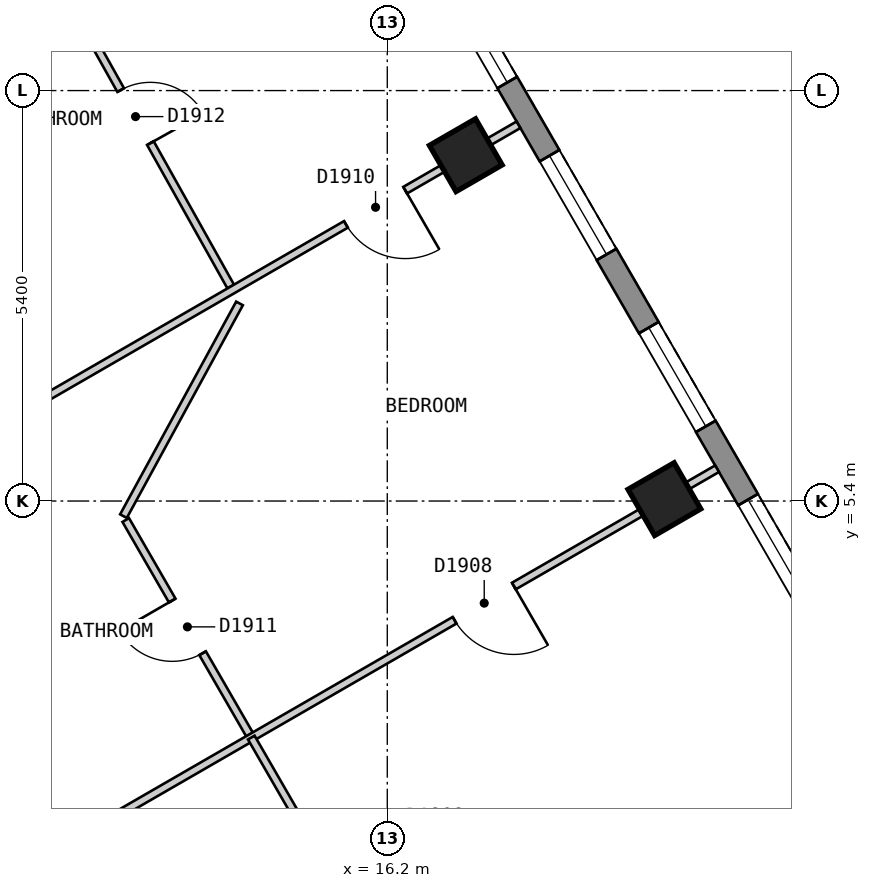
"""IFC4 building model, lengths in metres.
Left out: names, types, materials, properties, quantities, classifications, styles, units other than length and angle.
Written with IfcOpenShell. Run it as: python <this file> out.ifc"""

import sys

from ifc_helpers import new_model, si_unit, direction, frame, frame_2d, origin, origin_2d, place, context, subcontext, project, spatial, polyline, rectangle, outline, extrude, element, fill, save


model = new_model("IFC4")
c1 = context("Model", 3, precision=1e-05, world=origin(), true_north=direction((0.0, 1.0)))
c2 = subcontext(c1, "Body", "Model", "MODEL_VIEW")
j1 = project(units=[si_unit("LENGTHUNIT", "METRE"), si_unit("PLANEANGLEUNIT", "RADIAN")], contexts=[c1])
p1 = place(None, origin())
s1 = spatial("IfcSite", under=j1, at=p1, CompositionType="ELEMENT")
p2 = place(p1, origin())
s2 = spatial("IfcBuilding", under=s1, at=p2, CompositionType="ELEMENT")
p3 = place(p2, frame((0.0, 0.0, 220.8)))
s3 = spatial("IfcBuildingStorey", under=s2, at=p3, CompositionType="ELEMENT", Elevation=220.8)
for number, where, z_axis, x_axis in (
    (1, (19.846, 5.425, 0.0), (0.0, 0.0, 1.0), (-0.5, 0.866, 0.0)),
    (2, (17.233, 9.95, 0.0), (0.0, 0.0, 1.0), (-0.5, 0.866, 0.0)),
):
    element("IfcColumn", number, at=place(p3, frame(where, z_axis=z_axis, x_axis=x_axis)), inside=s3, PredefinedType="COLUMN", context=c2, shape_type="SweptSolid", body=[
        extrude(rectangle(XDim=0.7, YDim=0.7, at=origin_2d()), origin(), (0.0, 0.0, 1.0), 3.0),
    ])
p4 = place(p3, frame((23.599, 0.825, 0.0), z_axis=(0.0, 0.0, 1.0), x_axis=(-0.500003656944, 0.866023292436, 0.0)))
e3 = element("IfcWall", 3, at=p4, inside=s3, PredefinedType="SOLIDWALL", context=c2, shape_type="SweptSolid", body=[
    extrude(outline(polyline([(0.0, -0.15), (22.17, -0.15), (22.09, 0.15), (0.08, 0.15), (0.0, -0.15)])), origin(), (0.0, 0.0, 1.0), 2.7),
])
p5 = place(p4, frame((1.191, 0.0, 0.15)))
e4 = element("IfcOpeningElement", 4, at=p5, cuts=e3, PredefinedType="OPENING", context=c2, shape_type="SweptSolid", body=[
    extrude(rectangle(XDim=1.5, YDim=2.1, at=frame_2d((0.75, 1.05))), frame((0.0, 0.16, 0.0), z_axis=(0.0, -1.0, 0.0), x_axis=(1.0, 0.0, 0.0)), (0.0, 0.0, 1.0), 0.32),
])
p6 = place(p4, frame((3.804, 0.0, 0.15)))
e5 = element("IfcOpeningElement", 5, at=p6, cuts=e3, PredefinedType="OPENING", context=c2, shape_type="SweptSolid", body=[
    extrude(rectangle(XDim=1.5, YDim=2.1, at=frame_2d((0.75, 1.05))), frame((0.0, 0.16, 0.0), z_axis=(0.0, -1.0, 0.0), x_axis=(1.0, 0.0, 0.0)), (0.0, 0.0, 1.0), 0.32),
])
p7 = place(p4, frame((6.417, 0.0, 0.15)))
e6 = element("IfcOpeningElement", 6, at=p7, cuts=e3, PredefinedType="OPENING", context=c2, shape_type="SweptSolid", body=[
    extrude(rectangle(XDim=1.5, YDim=2.1, at=frame_2d((0.75, 1.05))), frame((0.0, 0.16, 0.0), z_axis=(0.0, -1.0, 0.0), x_axis=(1.0, 0.0, 0.0)), (0.0, 0.0, 1.0), 0.32),
])
p8 = place(p4, frame((9.029, 0.0, 0.15)))
e7 = element("IfcOpeningElement", 7, at=p8, cuts=e3, PredefinedType="OPENING", context=c2, shape_type="SweptSolid", body=[
    extrude(rectangle(XDim=1.5, YDim=2.1, at=frame_2d((0.75, 1.05))), frame((0.0, 0.16, 0.0), z_axis=(0.0, -1.0, 0.0), x_axis=(1.0, 0.0, 0.0)), (0.0, 0.0, 1.0), 0.32),
])
p9 = place(p4, frame((11.641, 0.0, 0.15)))
e8 = element("IfcOpeningElement", 8, at=p9, cuts=e3, PredefinedType="OPENING", context=c2, shape_type="SweptSolid", body=[
    extrude(rectangle(XDim=1.5, YDim=2.1, at=frame_2d((0.75, 1.05))), frame((0.0, 0.16, 0.0), z_axis=(0.0, -1.0, 0.0), x_axis=(1.0, 0.0, 0.0)), (0.0, 0.0, 1.0), 0.32),
])
p10 = place(p4, frame((14.254, 0.0, 0.15)))
e9 = element("IfcOpeningElement", 9, at=p10, cuts=e3, PredefinedType="OPENING", context=c2, shape_type="SweptSolid", body=[
    extrude(rectangle(XDim=1.5, YDim=2.1, at=frame_2d((0.75, 1.05))), frame((0.0, 0.16, 0.0), z_axis=(0.0, -1.0, 0.0), x_axis=(1.0, 0.0, 0.0)), (0.0, 0.0, 1.0), 0.32),
])
p11 = place(p4, frame((16.866, 0.0, 0.15)))
e10 = element("IfcOpeningElement", 10, at=p11, cuts=e3, PredefinedType="OPENING", context=c2, shape_type="SweptSolid", body=[
    extrude(rectangle(XDim=1.5, YDim=2.1, at=frame_2d((0.75, 1.05))), frame((0.0, 0.16, 0.0), z_axis=(0.0, -1.0, 0.0), x_axis=(1.0, 0.0, 0.0)), (0.0, 0.0, 1.0), 0.32),
])
p12 = place(p4, frame((19.479, 0.0, 0.15)))
e11 = element("IfcOpeningElement", 11, at=p12, cuts=e3, PredefinedType="OPENING", context=c2, shape_type="SweptSolid", body=[
    extrude(rectangle(XDim=1.5, YDim=2.1, at=frame_2d((0.75, 1.05))), frame((0.0, 0.16, 0.0), z_axis=(0.0, -1.0, 0.0), x_axis=(1.0, 0.0, 0.0)), (0.0, 0.0, 1.0), 0.32),
])
p13 = place(p3, frame((9.238, 5.2, 0.0), z_axis=(0.0, 0.0, 1.0), x_axis=(0.500025705601, -0.86601056214, 0.0)))
e12 = element("IfcWall", 12, at=p13, inside=s3, PredefinedType="PARTITIONING", context=c2, shape_type="SweptSolid", body=[
    extrude(rectangle(XDim=7.735, YDim=0.2, at=frame_2d((3.868, 0.0))), origin(), (0.0, 0.0, 1.0), 2.7),
])
p14 = place(p3, frame((12.759, 5.15, 0.0), z_axis=(0.0, 0.0, 1.0), x_axis=(0.499905801698, -0.866079782369, 0.0)))
e13 = element("IfcWall", 13, at=p14, inside=s3, PredefinedType="PARTITIONING", context=c2, shape_type="SweptSolid", body=[
    extrude(rectangle(XDim=3.304, YDim=0.1, at=frame_2d((1.652, 0.0))), origin(), (0.0, 0.0, 1.0), 2.7),
])
p15 = place(p14, frame((1.223, 0.0, 0.0)))
e14 = element("IfcOpeningElement", 14, at=p15, cuts=e13, PredefinedType="OPENING", context=c2, shape_type="SweptSolid", body=[
    extrude(rectangle(XDim=0.8, YDim=2.1, at=frame_2d((0.4, 1.05))), frame((0.0, 0.06, 0.0), z_axis=(0.0, -1.0, 0.0), x_axis=(1.0, 0.0, 0.0)), (0.0, 0.0, 1.0), 0.12),
])
p16 = place(p3, frame((11.66, 12.65, 0.0), z_axis=(0.0, 0.0, 1.0), x_axis=(0.488650242737, -0.872479764965, 0.0)))
e15 = element("IfcWall", 15, at=p16, inside=s3, PredefinedType="PARTITIONING", context=c2, shape_type="SweptSolid", body=[
    extrude(rectangle(XDim=5.075, YDim=0.1, at=frame_2d((2.538, 0.0))), origin(), (0.0, 0.0, 1.0), 2.7),
])
p17 = place(p16, frame((2.113, 0.0, 0.0)))
e16 = element("IfcOpeningElement", 16, at=p17, cuts=e15, PredefinedType="OPENING", context=c2, shape_type="SweptSolid", body=[
    extrude(rectangle(XDim=0.8, YDim=2.1, at=frame_2d((0.4, 1.05))), frame((0.0, 0.06, 0.0), z_axis=(0.0, -1.0, 0.0), x_axis=(1.0, 0.0, 0.0)), (0.0, 0.0, 1.0), 0.12),
])
p18 = place(p3, frame((12.729, 5.201, 0.0), z_axis=(0.0, 0.0, 1.0), x_axis=(0.478932598182, 0.877851676764, 0.0)))
e17 = element("IfcWall", 17, at=p18, inside=s3, PredefinedType="PARTITIONING", context=c2, shape_type="SweptSolid", body=[
    extrude(rectangle(XDim=3.188, YDim=0.1, at=frame_2d((1.594, 0.0))), origin(), (0.0, 0.0, 1.0), 2.7),
])
p19 = place(p3, frame((11.879, 0.826, 0.0), z_axis=(0.0, 0.0, 1.0), x_axis=(0.866065245018, 0.499930986609, 0.0)))
e18 = element("IfcWall", 18, at=p19, inside=s3, PredefinedType="PARTITIONING", context=c2, shape_type="SweptSolid", body=[
    extrude(rectangle(XDim=10.0, YDim=0.1, at=frame_2d((5.0, 0.0))), origin(), (0.0, 0.0, 1.0), 2.7),
])
p20 = place(p19, frame((6.012, 0.0, 0.0)))
e19 = element("IfcOpeningElement", 19, at=p20, cuts=e18, PredefinedType="OPENING", context=c2, shape_type="SweptSolid", body=[
    extrude(rectangle(XDim=0.9, YDim=2.1, at=frame_2d((0.45, 1.05))), frame((0.0, 0.06, 0.0), z_axis=(0.0, -1.0, 0.0), x_axis=(1.0, 0.0, 0.0)), (0.0, 0.0, 1.0), 0.12),
])
p21 = place(p3, frame((9.354, 5.401, 0.0), z_axis=(0.0, 0.0, 1.0), x_axis=(0.866018411306, 0.500012111133, 0.0)))
e20 = element("IfcWall", 20, at=p21, inside=s3, PredefinedType="PARTITIONING", context=c2, shape_type="SweptSolid", body=[
    extrude(rectangle(XDim=9.898, YDim=0.1, at=frame_2d((4.949, 0.0))), origin(), (0.0, 0.0, 1.0), 2.7),
])
p22 = place(p21, frame((7.277, 0.0, 0.0)))
e21 = element("IfcOpeningElement", 21, at=p22, cuts=e20, PredefinedType="OPENING", context=c2, shape_type="SweptSolid", body=[
    extrude(rectangle(XDim=0.9, YDim=2.1, at=frame_2d((0.45, 1.05))), frame((0.0, 0.06, 0.0), z_axis=(0.0, -1.0, 0.0), x_axis=(1.0, 0.0, 0.0)), (0.0, 0.0, 1.0), 0.12),
])
p23 = place(p3, frame((14.411, 2.288, 0.0), z_axis=(0.0, 0.0, 1.0), x_axis=(0.500009005995, -0.866020204108, 0.0)))
e22 = element("IfcWall", 22, at=p23, inside=s3, PredefinedType="PARTITIONING", context=c2, shape_type="SweptSolid", body=[
    extrude(rectangle(XDim=1.696, YDim=0.1, at=frame_2d((0.848, 0.0))), origin(), (0.0, 0.0, 1.0), 2.7),
])
p24 = place(p6, origin())
e23 = element("IfcWindow", 23, at=p24, inside=s3, PartitioningType="SINGLE_PANEL", PredefinedType="WINDOW", context=c2, shape_type="SweptSolid", body=[
    extrude(rectangle(XDim=1.5, YDim=2.1, at=frame_2d((0.75, 1.05))), frame((0.0, 0.03, 0.0), z_axis=(0.0, -1.0, 0.0), x_axis=(1.0, 0.0, 0.0)), (0.0, 0.0, 1.0), 0.06),
])
fill(e5, e23)
p25 = place(p7, origin())
e24 = element("IfcWindow", 24, at=p25, inside=s3, PartitioningType="SINGLE_PANEL", PredefinedType="WINDOW", context=c2, shape_type="SweptSolid", body=[
    extrude(rectangle(XDim=1.5, YDim=2.1, at=frame_2d((0.75, 1.05))), frame((0.0, 0.03, 0.0), z_axis=(0.0, -1.0, 0.0), x_axis=(1.0, 0.0, 0.0)), (0.0, 0.0, 1.0), 0.06),
])
fill(e6, e24)
p26 = place(p8, origin())
e25 = element("IfcWindow", 25, at=p26, inside=s3, PartitioningType="SINGLE_PANEL", PredefinedType="WINDOW", context=c2, shape_type="SweptSolid", body=[
    extrude(rectangle(XDim=1.5, YDim=2.1, at=frame_2d((0.75, 1.05))), frame((0.0, 0.03, 0.0), z_axis=(0.0, -1.0, 0.0), x_axis=(1.0, 0.0, 0.0)), (0.0, 0.0, 1.0), 0.06),
])
fill(e7, e25)
p27 = place(p9, origin())
e26 = element("IfcWindow", 26, at=p27, inside=s3, PartitioningType="SINGLE_PANEL", PredefinedType="WINDOW", context=c2, shape_type="SweptSolid", body=[
    extrude(rectangle(XDim=1.5, YDim=2.1, at=frame_2d((0.75, 1.05))), frame((0.0, 0.03, 0.0), z_axis=(0.0, -1.0, 0.0), x_axis=(1.0, 0.0, 0.0)), (0.0, 0.0, 1.0), 0.06),
])
fill(e8, e26)
p28 = place(p20, origin())
e27 = element("IfcDoor", 27, at=p28, inside=s3, OperationType="SINGLE_SWING_RIGHT", PredefinedType="DOOR", context=c2, shape_type="SweptSolid", body=[
    extrude(rectangle(XDim=0.9, YDim=2.1, at=frame_2d((0.45, 1.05))), frame((0.0, 0.025, 0.0), z_axis=(0.0, -1.0, 0.0), x_axis=(1.0, 0.0, 0.0)), (0.0, 0.0, 1.0), 0.05),
])
fill(e19, e27)
p29 = place(p22, origin())
e28 = element("IfcDoor", 28, at=p29, inside=s3, OperationType="SINGLE_SWING_RIGHT", PredefinedType="DOOR", context=c2, shape_type="SweptSolid", body=[
    extrude(rectangle(XDim=0.9, YDim=2.1, at=frame_2d((0.45, 1.05))), frame((0.0, 0.025, 0.0), z_axis=(0.0, -1.0, 0.0), x_axis=(1.0, 0.0, 0.0)), (0.0, 0.0, 1.0), 0.05),
])
fill(e21, e28)
p30 = place(p15, origin())
e29 = element("IfcDoor", 29, at=p30, inside=s3, OperationType="SINGLE_SWING_LEFT", PredefinedType="DOOR", context=c2, shape_type="SweptSolid", body=[
    extrude(rectangle(XDim=0.8, YDim=2.1, at=frame_2d((0.4, 1.05))), frame((0.0, 0.025, 0.0), z_axis=(0.0, -1.0, 0.0), x_axis=(1.0, 0.0, 0.0)), (0.0, 0.0, 1.0), 0.05),
])
fill(e14, e29)
p31 = place(p17, origin())
e30 = element("IfcDoor", 30, at=p31, inside=s3, OperationType="SINGLE_SWING_RIGHT", PredefinedType="DOOR", context=c2, shape_type="SweptSolid", body=[
    extrude(rectangle(XDim=0.8, YDim=2.1, at=frame_2d((0.4, 1.05))), frame((0.0, 0.025, 0.0), z_axis=(0.0, -1.0, 0.0), x_axis=(1.0, 0.0, 0.0)), (0.0, 0.0, 1.0), 0.05),
])
fill(e16, e30)
save(model, sys.argv[1])
